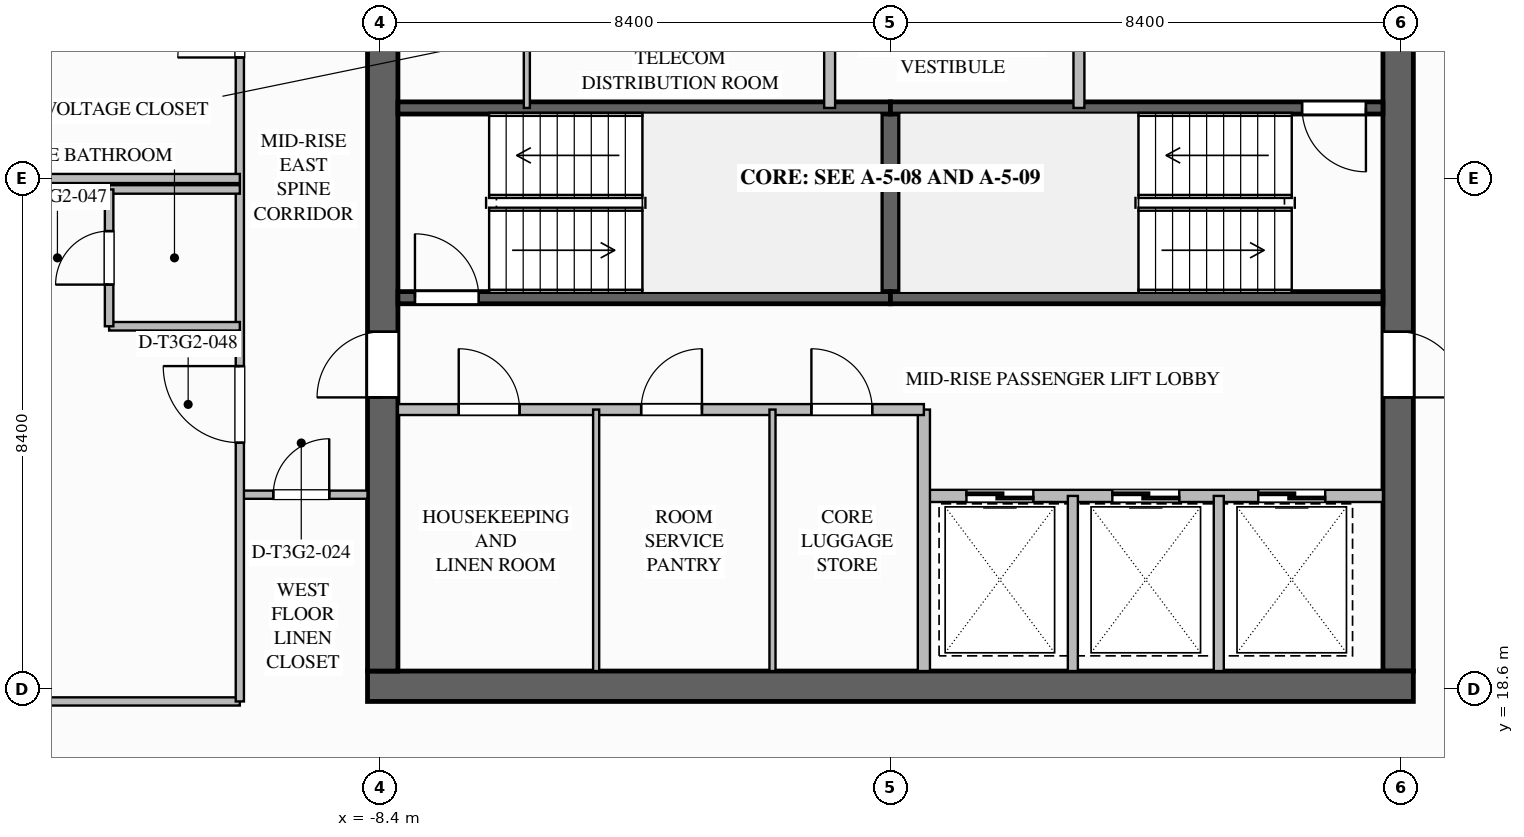
"""IFC4 building model, lengths in metres.
Left out: names, types, materials, properties, quantities, classifications, styles, units other than length and angle.
Written with IfcOpenShell. Run it as: python <this file> out.ifc"""

import sys

from ifc_helpers import new_model, si_unit, direction, frame, frame_2d, origin, place, context, subcontext, project, spatial, rectangle, extrude, element, fill, save


model = new_model("IFC4")
c1 = context("Model", 3, precision=1e-05, world=origin(), true_north=direction((0.0, 1.0)))
c2 = subcontext(c1, "Body", "Model", "MODEL_VIEW")
j1 = project(units=[si_unit("LENGTHUNIT", "METRE"), si_unit("PLANEANGLEUNIT", "RADIAN")], contexts=[c1])
p1 = place(None, origin())
s1 = spatial("IfcSite", under=j1, at=p1, CompositionType="ELEMENT")
p2 = place(p1, origin())
s2 = spatial("IfcBuilding", under=s1, at=p2, CompositionType="ELEMENT")
p3 = place(p2, frame((0.0, 0.0, 161.05)))
s3 = spatial("IfcBuildingStorey", under=s2, at=p3, CompositionType="ELEMENT", Elevation=161.05)
p4 = place(p3, frame((8.35, 35.1, 0.0), z_axis=(0.0, 0.0, 1.0), x_axis=(0.0, -1.0, 0.0)))
e1 = element("IfcWall", 1, at=p4, inside=s3, PredefinedType="SHEAR", context=c2, shape_type="SweptSolid", body=[
    extrude(rectangle(XDim=16.2, YDim=0.5, at=frame_2d((8.1, 0.0))), origin(), (0.0, 0.0, 1.0), 3.55),
])
p5 = place(p4, frame((3.08, 0.0, 0.0)))
e2 = element("IfcOpeningElement", 2, at=p5, cuts=e1, PredefinedType="OPENING", context=c2, shape_type="SweptSolid", body=[
    extrude(rectangle(XDim=1.12, YDim=2.1, at=frame_2d((0.56, 1.05))), frame((0.0, 0.26, 0.0), z_axis=(0.0, -1.0, 0.0), x_axis=(1.0, 0.0, 0.0)), (0.0, 0.0, 1.0), 0.52),
])
p6 = place(p4, frame((10.62, 0.0, 0.0)))
e3 = element("IfcOpeningElement", 3, at=p6, cuts=e1, PredefinedType="OPENING", context=c2, shape_type="SweptSolid", body=[
    extrude(rectangle(XDim=1.08, YDim=2.04, at=frame_2d((0.54, 1.02))), frame((0.0, 0.26, 0.0), z_axis=(0.0, -1.0, 0.0), x_axis=(1.0, 0.0, 0.0)), (0.0, 0.0, 1.0), 0.52),
])
p7 = place(p3, frame((8.6, 18.65, 0.0), z_axis=(0.0, 0.0, 1.0), x_axis=(-1.0, 0.0, 0.0)))
e4 = element("IfcWall", 4, at=p7, inside=s3, PredefinedType="SHEAR", context=c2, shape_type="SweptSolid", body=[
    extrude(rectangle(XDim=17.2, YDim=0.5, at=frame_2d((8.6, 0.0))), origin(), (0.0, 0.0, 1.0), 3.55),
])
p8 = place(p3, frame((-8.35, 18.9, 0.0), z_axis=(0.0, 0.0, 1.0), x_axis=(0.0, 1.0, 0.0)))
e5 = element("IfcWall", 5, at=p8, inside=s3, PredefinedType="SHEAR", context=c2, shape_type="SweptSolid", body=[
    extrude(rectangle(XDim=16.2, YDim=0.5, at=frame_2d((8.1, 0.0))), origin(), (0.0, 0.0, 1.0), 3.55),
])
p9 = place(p8, frame((12.02, 0.0, 0.0)))
e6 = element("IfcOpeningElement", 6, at=p9, cuts=e5, PredefinedType="OPENING", context=c2, shape_type="SweptSolid", body=[
    extrude(rectangle(XDim=1.08, YDim=2.04, at=frame_2d((0.54, 1.02))), frame((0.0, 0.26, 0.0), z_axis=(0.0, -1.0, 0.0), x_axis=(1.0, 0.0, 0.0)), (0.0, 0.0, 1.0), 0.52),
])
p10 = place(p8, frame((4.5, 0.0, 0.0)))
e7 = element("IfcOpeningElement", 7, at=p10, cuts=e5, PredefinedType="OPENING", context=c2, shape_type="SweptSolid", body=[
    extrude(rectangle(XDim=1.08, YDim=2.04, at=frame_2d((0.54, 1.02))), frame((0.0, 0.26, 0.0), z_axis=(0.0, -1.0, 0.0), x_axis=(1.0, 0.0, 0.0)), (0.0, 0.0, 1.0), 0.52),
])
p11 = place(p3, frame((0.0, 25.04, 0.0), z_axis=(0.0, 0.0, 1.0), x_axis=(0.0, 1.0, 0.0)))
e8 = element("IfcWall", 8, at=p11, inside=s3, PredefinedType="SOLIDWALL", context=c2, shape_type="SweptSolid", body=[
    extrude(rectangle(XDim=3.12, YDim=0.3, at=frame_2d((1.56, 0.0))), origin(), (0.0, 0.0, 1.0), 3.29),
])
p12 = place(p3, frame((-8.1, 25.04, 0.0), z_axis=(0.0, 0.0, 1.0), x_axis=(1.0, 0.0, 0.0)))
e9 = element("IfcWall", 9, at=p12, inside=s3, PredefinedType="SOLIDWALL", context=c2, shape_type="SweptSolid", body=[
    extrude(rectangle(XDim=8.1, YDim=0.2, at=frame_2d((4.05, 0.0))), origin(), (0.0, 0.0, 1.0), 3.29),
])
p13 = place(p12, frame((0.28, 0.0, 0.0)))
e10 = element("IfcOpeningElement", 10, at=p13, cuts=e9, PredefinedType="OPENING", context=c2, shape_type="SweptSolid", body=[
    extrude(rectangle(XDim=1.05, YDim=2.1, at=frame_2d((0.525, 1.05))), frame((0.0, 0.11, 0.0), z_axis=(0.0, -1.0, 0.0), x_axis=(1.0, 0.0, 0.0)), (0.0, 0.0, 1.0), 0.22),
])
for number, where, z_axis, x_axis in (
    (11, (-8.1, 28.16, 0.0), (0.0, 0.0, 1.0), (1.0, 0.0, 0.0)),
    (12, (0.0, 25.04, 0.0), (0.0, 0.0, 1.0), (1.0, 0.0, 0.0)),
):
    element("IfcWall", number, at=place(p3, frame(where, z_axis=z_axis, x_axis=x_axis)), inside=s3, PredefinedType="SOLIDWALL", context=c2, shape_type="SweptSolid", body=[
        extrude(rectangle(XDim=8.1, YDim=0.2, at=frame_2d((4.05, 0.0))), origin(), (0.0, 0.0, 1.0), 3.29),
    ])
p14 = place(p3, frame((8.1, 28.16, 0.0), z_axis=(0.0, 0.0, 1.0), x_axis=(-1.0, 0.0, 0.0)))
e13 = element("IfcWall", 13, at=p14, inside=s3, PredefinedType="SOLIDWALL", context=c2, shape_type="SweptSolid", body=[
    extrude(rectangle(XDim=8.1, YDim=0.2, at=frame_2d((4.05, 0.0))), origin(), (0.0, 0.0, 1.0), 3.29),
])
p15 = place(p14, frame((0.28, 0.0, 0.0)))
e14 = element("IfcOpeningElement", 14, at=p15, cuts=e13, PredefinedType="OPENING", context=c2, shape_type="SweptSolid", body=[
    extrude(rectangle(XDim=1.05, YDim=2.1, at=frame_2d((0.525, 1.05))), frame((0.0, 0.11, 0.0), z_axis=(0.0, -1.0, 0.0), x_axis=(1.0, 0.0, 0.0)), (0.0, 0.0, 1.0), 0.22),
])
p16 = place(p3, frame((3.1, 28.16, 0.0), z_axis=(0.0, 0.0, 1.0), x_axis=(0.0, 1.0, 0.0)))
e15 = element("IfcWall", 15, at=p16, inside=s3, PredefinedType="SOLIDWALL", context=c2, shape_type="SweptSolid", body=[
    extrude(rectangle(XDim=4.06, YDim=0.18, at=frame_2d((2.03, 0.0))), origin(), (0.0, 0.0, 1.0), 3.29),
])
p17 = place(p16, frame((1.4, 0.0, 0.0)))
e16 = element("IfcOpeningElement", 16, at=p17, cuts=e15, PredefinedType="OPENING", context=c2, shape_type="SweptSolid", body=[
    extrude(rectangle(XDim=1.12, YDim=2.1, at=frame_2d((0.56, 1.05))), frame((0.0, 0.1, 0.0), z_axis=(0.0, -1.0, 0.0), x_axis=(1.0, 0.0, 0.0)), (0.0, 0.0, 1.0), 0.2),
])
p18 = place(p3, frame((-1.0, 28.16, 0.0), z_axis=(0.0, 0.0, 1.0), x_axis=(0.0, 1.0, 0.0)))
e17 = element("IfcWall", 17, at=p18, inside=s3, PredefinedType="SOLIDWALL", context=c2, shape_type="SweptSolid", body=[
    extrude(rectangle(XDim=4.02, YDim=0.18, at=frame_2d((2.01, 0.0))), origin(), (0.0, 0.0, 1.0), 3.29),
])
p19 = place(p18, frame((2.49, 0.0, 0.0)))
e18 = element("IfcOpeningElement", 18, at=p19, cuts=e17, PredefinedType="OPENING", context=c2, shape_type="SweptSolid", body=[
    extrude(rectangle(XDim=1.0, YDim=2.1, at=frame_2d((0.5, 1.05))), frame((0.0, 0.1, 0.0), z_axis=(0.0, -1.0, 0.0), x_axis=(1.0, 0.0, 0.0)), (0.0, 0.0, 1.0), 0.2),
])
p20 = place(p3, frame((-5.98, 28.16, 0.0), z_axis=(0.0, 0.0, 1.0), x_axis=(0.0, 1.0, 0.0)))
e19 = element("IfcWall", 19, at=p20, inside=s3, PredefinedType="PARTITIONING", context=c2, shape_type="SweptSolid", body=[
    extrude(rectangle(XDim=1.98, YDim=0.1, at=frame_2d((0.99, 0.0))), origin(), (0.0, 0.0, 1.0), 3.29),
])
p21 = place(p3, frame((8.1, 21.78, 0.0), z_axis=(0.0, 0.0, 1.0), x_axis=(-1.0, 0.0, 0.0)))
e20 = element("IfcWall", 20, at=p21, inside=s3, PredefinedType="SOLIDWALL", context=c2, shape_type="SweptSolid", body=[
    extrude(rectangle(XDim=7.55, YDim=0.2, at=frame_2d((3.775, 0.0))), origin(), (0.0, 0.0, 1.0), 3.29),
])
p22 = place(p21, frame((5.75, 0.0, 0.0)))
e21 = element("IfcOpeningElement", 21, at=p22, cuts=e20, PredefinedType="OPENING", context=c2, shape_type="SweptSolid", body=[
    extrude(rectangle(XDim=1.1, YDim=2.2, at=frame_2d((0.55, 1.1))), frame((0.0, 0.11, 0.0), z_axis=(0.0, -1.0, 0.0), x_axis=(1.0, 0.0, 0.0)), (0.0, 0.0, 1.0), 0.22),
])
p23 = place(p21, frame((3.35, 0.0, 0.0)))
e22 = element("IfcOpeningElement", 22, at=p23, cuts=e20, PredefinedType="OPENING", context=c2, shape_type="SweptSolid", body=[
    extrude(rectangle(XDim=1.1, YDim=2.2, at=frame_2d((0.55, 1.1))), frame((0.0, 0.11, 0.0), z_axis=(0.0, -1.0, 0.0), x_axis=(1.0, 0.0, 0.0)), (0.0, 0.0, 1.0), 0.22),
])
p24 = place(p21, frame((0.95, 0.0, 0.0)))
e23 = element("IfcOpeningElement", 23, at=p24, cuts=e20, PredefinedType="OPENING", context=c2, shape_type="SweptSolid", body=[
    extrude(rectangle(XDim=1.1, YDim=2.2, at=frame_2d((0.55, 1.1))), frame((0.0, 0.11, 0.0), z_axis=(0.0, -1.0, 0.0), x_axis=(1.0, 0.0, 0.0)), (0.0, 0.0, 1.0), 0.22),
])
p25 = place(p3, frame((0.55, 18.9, 0.0), z_axis=(0.0, 0.0, 1.0), x_axis=(0.0, 1.0, 0.0)))
e24 = element("IfcWall", 24, at=p25, inside=s3, PredefinedType="SOLIDWALL", context=c2, shape_type="SweptSolid", body=[
    extrude(rectangle(XDim=4.3, YDim=0.2, at=frame_2d((2.15, 0.0))), origin(), (0.0, 0.0, 1.0), 3.29),
])
for number, where, z_axis, x_axis in (
    (25, (3.0, 18.9, 0.0), (0.0, 0.0, 1.0), (0.0, 1.0, 0.0)),
    (26, (5.4, 18.9, 0.0), (0.0, 0.0, 1.0), (0.0, 1.0, 0.0)),
):
    element("IfcWall", number, at=place(p3, frame(where, z_axis=z_axis, x_axis=x_axis)), inside=s3, PredefinedType="PARTITIONING", context=c2, shape_type="SweptSolid", body=[
        extrude(rectangle(XDim=2.88, YDim=0.165, at=frame_2d((1.44, 0.0))), origin(), (0.0, 0.0, 1.0), 3.29),
    ])
p26 = place(p3, frame((-8.1, 23.2, 0.0), z_axis=(0.0, 0.0, 1.0), x_axis=(1.0, 0.0, 0.0)))
e27 = element("IfcWall", 27, at=p26, inside=s3, PredefinedType="SOLIDWALL", context=c2, shape_type="SweptSolid", body=[
    extrude(rectangle(XDim=8.65, YDim=0.18, at=frame_2d((4.325, 0.0))), origin(), (0.0, 0.0, 1.0), 3.29),
])
p27 = place(p26, frame((1.0, 0.0, 0.0)))
e28 = element("IfcOpeningElement", 28, at=p27, cuts=e27, PredefinedType="OPENING", context=c2, shape_type="SweptSolid", body=[
    extrude(rectangle(XDim=1.0, YDim=2.1, at=frame_2d((0.5, 1.05))), frame((0.0, 0.1, 0.0), z_axis=(0.0, -1.0, 0.0), x_axis=(1.0, 0.0, 0.0)), (0.0, 0.0, 1.0), 0.2),
])
p28 = place(p26, frame((4.0, 0.0, 0.0)))
e29 = element("IfcOpeningElement", 29, at=p28, cuts=e27, PredefinedType="OPENING", context=c2, shape_type="SweptSolid", body=[
    extrude(rectangle(XDim=1.0, YDim=2.1, at=frame_2d((0.5, 1.05))), frame((0.0, 0.1, 0.0), z_axis=(0.0, -1.0, 0.0), x_axis=(1.0, 0.0, 0.0)), (0.0, 0.0, 1.0), 0.2),
])
p29 = place(p26, frame((6.8, 0.0, 0.0)))
e30 = element("IfcOpeningElement", 30, at=p29, cuts=e27, PredefinedType="OPENING", context=c2, shape_type="SweptSolid", body=[
    extrude(rectangle(XDim=1.0, YDim=2.1, at=frame_2d((0.5, 1.05))), frame((0.0, 0.1, 0.0), z_axis=(0.0, -1.0, 0.0), x_axis=(1.0, 0.0, 0.0)), (0.0, 0.0, 1.0), 0.2),
])
for number, where, z_axis, x_axis in (
    (31, (-4.84, 18.9, 0.0), (0.0, 0.0, 1.0), (0.0, 1.0, 0.0)),
    (32, (-1.94, 18.9, 0.0), (0.0, 0.0, 1.0), (0.0, 1.0, 0.0)),
):
    element("IfcWall", number, at=place(p3, frame(where, z_axis=z_axis, x_axis=x_axis)), inside=s3, PredefinedType="PARTITIONING", context=c2, shape_type="SweptSolid", body=[
        extrude(rectangle(XDim=4.3, YDim=0.1, at=frame_2d((2.15, 0.0))), origin(), (0.0, 0.0, 1.0), 3.29),
    ])
p30 = place(p3, frame((-10.7, 21.8, 0.0), z_axis=(0.0, 0.0, 1.0), x_axis=(1.0, 0.0, 0.0)))
e33 = element("IfcWall", 33, at=p30, inside=s3, PredefinedType="PARTITIONING", context=c2, shape_type="SweptSolid", body=[
    extrude(rectangle(XDim=2.1, YDim=0.135, at=frame_2d((1.05, 0.0))), origin(), (0.0, 0.0, 1.0), 3.29),
])
p31 = place(p30, frame((0.55, 0.0, 0.0)))
e34 = element("IfcOpeningElement", 34, at=p31, cuts=e33, PredefinedType="OPENING", context=c2, shape_type="SweptSolid", body=[
    extrude(rectangle(XDim=0.92, YDim=2.1, at=frame_2d((0.46, 1.05))), frame((0.0, 0.077, 0.0), z_axis=(0.0, -1.0, 0.0), x_axis=(1.0, 0.0, 0.0)), (0.0, 0.0, 1.0), 0.155),
])
p32 = place(p3, frame((-16.2, 18.4, 0.0), z_axis=(0.0, 0.0, 1.0), x_axis=(1.0, 0.0, 0.0)))
e35 = element("IfcWall", 35, at=p32, inside=s3, PredefinedType="PARTITIONING", context=c2, shape_type="SweptSolid", body=[
    extrude(rectangle(XDim=5.5, YDim=0.135, at=frame_2d((2.75, 0.0))), origin(), (0.0, 0.0, 1.0), 2.667),
])
p33 = place(p3, frame((-10.7, 18.4, 0.0), z_axis=(0.0, 0.0, 1.0), x_axis=(0.0, 1.0, 0.0)))
e36 = element("IfcWall", 36, at=p33, inside=s3, PredefinedType="PARTITIONING", context=c2, shape_type="SweptSolid", body=[
    extrude(rectangle(XDim=17.2, YDim=0.135, at=frame_2d((8.6, 0.0))), origin(), (0.0, 0.0, 1.0), 3.29),
])
p34 = place(p33, frame((4.255, 0.0, 0.0)))
e37 = element("IfcOpeningElement", 37, at=p34, cuts=e36, PredefinedType="OPENING", context=c2, shape_type="SweptSolid", body=[
    extrude(rectangle(XDim=1.26, YDim=2.2, at=frame_2d((0.63, 1.1))), frame((0.0, 0.077, 0.0), z_axis=(0.0, -1.0, 0.0), x_axis=(1.0, 0.0, 0.0)), (0.0, 0.0, 1.0), 0.155),
])
p35 = place(p33, frame((10.59, 0.0, 0.0)))
e38 = element("IfcOpeningElement", 38, at=p35, cuts=e36, PredefinedType="OPENING", context=c2, shape_type="SweptSolid", body=[
    extrude(rectangle(XDim=1.02, YDim=2.15, at=frame_2d((0.51, 1.075))), frame((0.0, 0.077, 0.0), z_axis=(0.0, -1.0, 0.0), x_axis=(1.0, 0.0, 0.0)), (0.0, 0.0, 1.0), 0.155),
])
p36 = place(p3, frame((-26.2, 27.0, 0.0), z_axis=(0.0, 0.0, 1.0), x_axis=(1.0, 0.0, 0.0)))
e39 = element("IfcWall", 39, at=p36, inside=s3, PredefinedType="PARTITIONING", context=c2, shape_type="SweptSolid", body=[
    extrude(rectangle(XDim=15.5, YDim=0.15, at=frame_2d((7.75, 0.0))), origin(), (0.0, 0.0, 1.0), 2.58),
])
p37 = place(p3, frame((-10.7, 24.57, 0.0), z_axis=(0.0, 0.0, 1.0), x_axis=(-1.0, 0.0, 0.0)))
e40 = element("IfcWall", 40, at=p37, inside=s3, PredefinedType="PLUMBINGWALL", context=c2, shape_type="SweptSolid", body=[
    extrude(rectangle(XDim=2.15, YDim=0.14, at=frame_2d((1.075, 0.0))), origin(), (0.0, 0.0, 1.0), 3.29),
])
p38 = place(p3, frame((-10.7, 26.82, 0.0), z_axis=(0.0, 0.0, 1.0), x_axis=(-1.0, 0.0, 0.0)))
e41 = element("IfcWall", 41, at=p38, inside=s3, PredefinedType="PLUMBINGWALL", context=c2, shape_type="SweptSolid", body=[
    extrude(rectangle(XDim=2.15, YDim=0.14, at=frame_2d((1.075, 0.0))), origin(), (0.0, 0.0, 1.0), 2.667),
])
p39 = place(p3, frame((-12.85, 24.57, 0.0), z_axis=(0.0, 0.0, 1.0), x_axis=(0.0, 1.0, 0.0)))
e42 = element("IfcWall", 42, at=p39, inside=s3, PredefinedType="PLUMBINGWALL", context=c2, shape_type="SweptSolid", body=[
    extrude(rectangle(XDim=2.25, YDim=0.14, at=frame_2d((1.125, 0.0))), origin(), (0.0, 0.0, 1.0), 3.29),
])
p40 = place(p39, frame((0.685, 0.0, 0.0)))
e43 = element("IfcOpeningElement", 43, at=p40, cuts=e42, PredefinedType="OPENING", context=c2, shape_type="SweptSolid", body=[
    extrude(rectangle(XDim=0.88, YDim=2.1, at=frame_2d((0.44, 1.05))), frame((0.0, 0.08, 0.0), z_axis=(0.0, -1.0, 0.0), x_axis=(1.0, 0.0, 0.0)), (0.0, 0.0, 1.0), 0.16),
])
p41 = place(p13, origin())
e44 = element("IfcDoor", 44, at=p41, inside=s3, OperationType="SINGLE_SWING_LEFT", PredefinedType="DOOR", context=c2, shape_type="SweptSolid", body=[
    extrude(rectangle(XDim=1.05, YDim=2.1, at=frame_2d((0.525, 1.05))), frame((0.0, 0.025, 0.0), z_axis=(0.0, -1.0, 0.0), x_axis=(1.0, 0.0, 0.0)), (0.0, 0.0, 1.0), 0.05),
])
fill(e10, e44)
p42 = place(p15, origin())
e45 = element("IfcDoor", 45, at=p42, inside=s3, OperationType="SINGLE_SWING_LEFT", PredefinedType="DOOR", context=c2, shape_type="SweptSolid", body=[
    extrude(rectangle(XDim=1.05, YDim=2.1, at=frame_2d((0.525, 1.05))), frame((0.0, 0.025, 0.0), z_axis=(0.0, -1.0, 0.0), x_axis=(1.0, 0.0, 0.0)), (0.0, 0.0, 1.0), 0.05),
])
fill(e14, e45)
p43 = place(p22, origin())
e46 = element("IfcDoor", 46, at=p43, inside=s3, OperationType="SLIDING_TO_LEFT", PredefinedType="DOOR", context=c2, shape_type="SweptSolid", body=[
    extrude(rectangle(XDim=1.1, YDim=2.2, at=frame_2d((0.55, 1.1))), frame((0.0, 0.025, 0.0), z_axis=(0.0, -1.0, 0.0), x_axis=(1.0, 0.0, 0.0)), (0.0, 0.0, 1.0), 0.05),
])
fill(e21, e46)
p44 = place(p23, origin())
e47 = element("IfcDoor", 47, at=p44, inside=s3, OperationType="SLIDING_TO_LEFT", PredefinedType="DOOR", context=c2, shape_type="SweptSolid", body=[
    extrude(rectangle(XDim=1.1, YDim=2.2, at=frame_2d((0.55, 1.1))), frame((0.0, 0.025, 0.0), z_axis=(0.0, -1.0, 0.0), x_axis=(1.0, 0.0, 0.0)), (0.0, 0.0, 1.0), 0.05),
])
fill(e22, e47)
p45 = place(p24, origin())
e48 = element("IfcDoor", 48, at=p45, inside=s3, OperationType="SLIDING_TO_LEFT", PredefinedType="DOOR", context=c2, shape_type="SweptSolid", body=[
    extrude(rectangle(XDim=1.1, YDim=2.2, at=frame_2d((0.55, 1.1))), frame((0.0, 0.025, 0.0), z_axis=(0.0, -1.0, 0.0), x_axis=(1.0, 0.0, 0.0)), (0.0, 0.0, 1.0), 0.05),
])
fill(e23, e48)
p46 = place(p10, origin())
e49 = element("IfcDoor", 49, at=p46, inside=s3, OperationType="SINGLE_SWING_LEFT", PredefinedType="DOOR", context=c2, shape_type="SweptSolid", body=[
    extrude(rectangle(XDim=1.08, YDim=2.04, at=frame_2d((0.54, 1.02))), frame((0.0, 0.025, 0.0), z_axis=(0.0, -1.0, 0.0), x_axis=(1.0, 0.0, 0.0)), (0.0, 0.0, 1.0), 0.05),
])
fill(e7, e49)
p47 = place(p6, origin())
e50 = element("IfcDoor", 50, at=p47, inside=s3, OperationType="SINGLE_SWING_RIGHT", PredefinedType="DOOR", context=c2, shape_type="SweptSolid", body=[
    extrude(rectangle(XDim=1.08, YDim=2.04, at=frame_2d((0.54, 1.02))), frame((0.0, 0.025, 0.0), z_axis=(0.0, -1.0, 0.0), x_axis=(1.0, 0.0, 0.0)), (0.0, 0.0, 1.0), 0.05),
])
fill(e3, e50)
p48 = place(p27, origin())
e51 = element("IfcDoor", 51, at=p48, inside=s3, OperationType="SINGLE_SWING_LEFT", PredefinedType="DOOR", context=c2, shape_type="SweptSolid", body=[
    extrude(rectangle(XDim=1.0, YDim=2.1, at=frame_2d((0.5, 1.05))), frame((0.0, 0.025, 0.0), z_axis=(0.0, -1.0, 0.0), x_axis=(1.0, 0.0, 0.0)), (0.0, 0.0, 1.0), 0.05),
])
fill(e28, e51)
p49 = place(p28, origin())
e52 = element("IfcDoor", 52, at=p49, inside=s3, OperationType="SINGLE_SWING_RIGHT", PredefinedType="DOOR", context=c2, shape_type="SweptSolid", body=[
    extrude(rectangle(XDim=1.0, YDim=2.1, at=frame_2d((0.5, 1.05))), frame((0.0, 0.025, 0.0), z_axis=(0.0, -1.0, 0.0), x_axis=(1.0, 0.0, 0.0)), (0.0, 0.0, 1.0), 0.05),
])
fill(e29, e52)
p50 = place(p29, origin())
e53 = element("IfcDoor", 53, at=p50, inside=s3, OperationType="SINGLE_SWING_LEFT", PredefinedType="DOOR", context=c2, shape_type="SweptSolid", body=[
    extrude(rectangle(XDim=1.0, YDim=2.1, at=frame_2d((0.5, 1.05))), frame((0.0, 0.025, 0.0), z_axis=(0.0, -1.0, 0.0), x_axis=(1.0, 0.0, 0.0)), (0.0, 0.0, 1.0), 0.05),
])
fill(e30, e53)
p51 = place(p31, origin())
e54 = element("IfcDoor", 54, at=p51, inside=s3, OperationType="SINGLE_SWING_RIGHT", PredefinedType="DOOR", context=c2, shape_type="SweptSolid", body=[
    extrude(rectangle(XDim=0.92, YDim=2.1, at=frame_2d((0.46, 1.05))), frame((0.0, 0.025, 0.0), z_axis=(0.0, -1.0, 0.0), x_axis=(1.0, 0.0, 0.0)), (0.0, 0.0, 1.0), 0.05),
])
fill(e34, e54)
p52 = place(p40, origin())
e55 = element("IfcDoor", 55, at=p52, inside=s3, OperationType="SINGLE_SWING_LEFT", PredefinedType="DOOR", context=c2, shape_type="SweptSolid", body=[
    extrude(rectangle(XDim=0.88, YDim=2.1, at=frame_2d((0.44, 1.05))), frame((0.0, 0.025, 0.0), z_axis=(0.0, -1.0, 0.0), x_axis=(1.0, 0.0, 0.0)), (0.0, 0.0, 1.0), 0.05),
])
fill(e43, e55)
p53 = place(p34, origin())
e56 = element("IfcDoor", 56, at=p53, inside=s3, OperationType="SINGLE_SWING_RIGHT", PredefinedType="DOOR", context=c2, shape_type="SweptSolid", body=[
    extrude(rectangle(XDim=1.26, YDim=2.2, at=frame_2d((0.63, 1.1))), frame((0.0, 0.025, 0.0), z_axis=(0.0, -1.0, 0.0), x_axis=(1.0, 0.0, 0.0)), (0.0, 0.0, 1.0), 0.05),
])
fill(e37, e56)
p54 = place(p35, origin())
e57 = element("IfcDoor", 57, at=p54, inside=s3, OperationType="SINGLE_SWING_LEFT", PredefinedType="DOOR", context=c2, shape_type="SweptSolid", body=[
    extrude(rectangle(XDim=1.02, YDim=2.15, at=frame_2d((0.51, 1.075))), frame((0.0, 0.025, 0.0), z_axis=(0.0, -1.0, 0.0), x_axis=(1.0, 0.0, 0.0)), (0.0, 0.0, 1.0), 0.05),
])
fill(e38, e57)
save(model, sys.argv[1])
